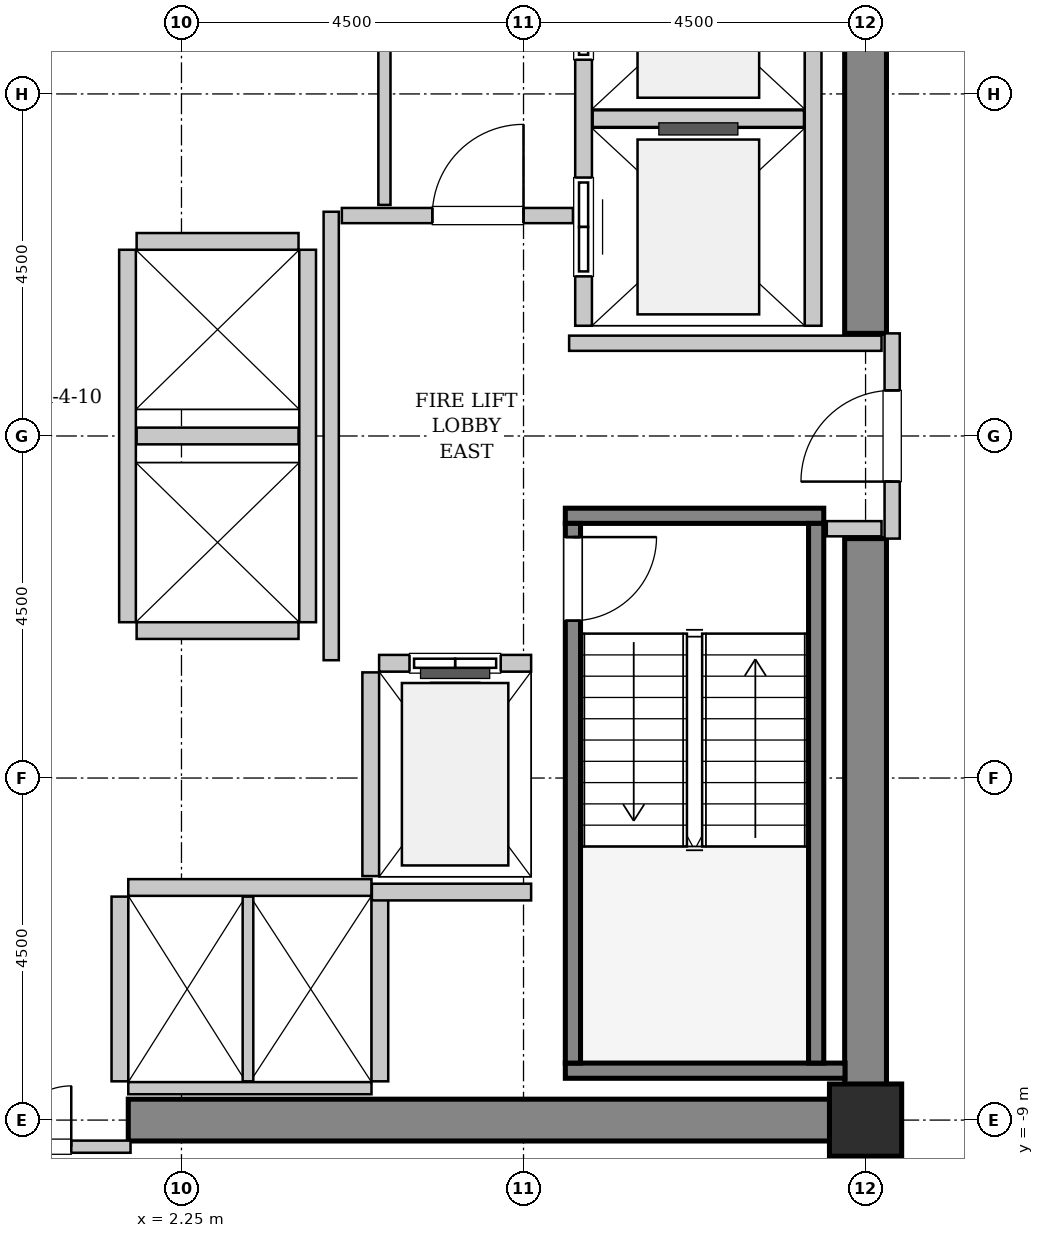
"""IFC4 building model, lengths in metres.
Left out: names, types, materials, properties, quantities, classifications, styles, units other than length and angle.
Written with IfcOpenShell. Run it as: python <this file> out.ifc"""

import sys

from ifc_helpers import new_model, si_unit, direction, frame, frame_2d, origin, origin_2d, place, context, subcontext, project, spatial, rectangle, hollow_rectangle, extrude, source, transform, mapped, element, fill, save


model = new_model("IFC4")
c1 = context("Model", 3, precision=1e-05, world=origin(), true_north=direction((0.0, 1.0)))
c2 = subcontext(c1, "Body", "Model", "MODEL_VIEW")
j1 = project(units=[si_unit("LENGTHUNIT", "METRE"), si_unit("PLANEANGLEUNIT", "RADIAN")], contexts=[c1])
p1 = place(None, origin())
s1 = spatial("IfcSite", under=j1, at=p1, CompositionType="ELEMENT")
p2 = place(p1, origin())
s2 = spatial("IfcBuilding", under=s1, at=p2, CompositionType="ELEMENT")
p3 = place(p2, frame((0.0, 0.0, 117.4)))
s3 = spatial("IfcBuildingStorey", under=s2, at=p3, CompositionType="ELEMENT", Elevation=117.4)
m1 = source(origin(), c2, "Body", "SweptSolid", [
    extrude(rectangle(XDim=9.975, YDim=0.55, at=frame_2d((4.987, 0.0))), origin(), (0.0, 0.0, 1.0), 3.8),
])
p4 = place(p3, frame((1.55, -9.0, 0.0), z_axis=(0.0, 0.0, 1.0), x_axis=(1.0, 0.0, 0.0)))
e1 = element("IfcWall", 1, at=p4, inside=s3, PredefinedType="SHEAR", context=c2, shape_type="MappedRepresentation", body=[
    mapped(m1, transform((0.0, 0.0, 0.0), x_axis=(1.0, 0.0, 0.0), y_axis=(0.0, 1.0, 0.0), z_axis=(0.0, 0.0, 1.0), scale=1.0)),
])
m2 = source(origin(), c2, "Body", "SweptSolid", [
    extrude(rectangle(XDim=7.375, YDim=0.55, at=frame_2d((3.688, 0.0))), origin(), (0.0, 0.0, 1.0), 3.8),
])
for number, where, z_axis, x_axis in (
    (2, (11.25, -8.725, 0.0), (0.0, 0.0, 1.0), (0.0, 1.0, 0.0)),
    (3, (11.25, 1.35, 0.0), (0.0, 0.0, 1.0), (0.0, 1.0, 0.0)),
):
    element("IfcWall", number, at=place(p3, frame(where, z_axis=z_axis, x_axis=x_axis)), inside=s3, PredefinedType="SHEAR", context=c2, shape_type="MappedRepresentation", body=[
        mapped(m2, transform((0.0, 0.0, 0.0), x_axis=(1.0, 0.0, 0.0), y_axis=(0.0, 1.0, 0.0), z_axis=(0.0, 0.0, 1.0), scale=1.0)),
    ])
m3 = source(origin(), c2, "Body", "SweptSolid", [
    extrude(hollow_rectangle(XDim=0.95, YDim=0.95, WallThickness=0.045, InnerFilletRadius=0.045, OuterFilletRadius=0.09, at=origin_2d()), origin(), (0.0, 0.0, 1.0), 3.8),
])
p5 = place(p3, frame((11.25, -9.0, 0.0), z_axis=(0.0, 0.0, 1.0), x_axis=(1.0, 0.0, 0.0)))
e4 = element("IfcColumn", 4, at=p5, inside=s3, PredefinedType="COLUMN", context=c2, shape_type="MappedRepresentation", body=[
    mapped(m3, transform((0.0, 0.0, 0.0), x_axis=(1.0, 0.0, 0.0), y_axis=(0.0, 1.0, 0.0), z_axis=(0.0, 0.0, 1.0), scale=1.0)),
])
m4 = source(origin(), c2, "Body", "SweptSolid", [
    extrude(rectangle(XDim=3.4, YDim=0.2, at=frame_2d((1.7, 0.0))), origin(), (0.0, 0.0, 1.0), 3.8),
])
p6 = place(p3, frame((7.3, -1.05, 0.0), z_axis=(0.0, 0.0, 1.0), x_axis=(1.0, 0.0, 0.0)))
e5 = element("IfcWall", 5, at=p6, inside=s3, PredefinedType="SOLIDWALL", context=c2, shape_type="MappedRepresentation", body=[
    mapped(m4, transform((0.0, 0.0, 0.0), x_axis=(1.0, 0.0, 0.0), y_axis=(0.0, 1.0, 0.0), z_axis=(0.0, 0.0, 1.0), scale=1.0)),
])
m5 = source(origin(), c2, "Body", "SweptSolid", [
    extrude(rectangle(XDim=3.68, YDim=0.2, at=frame_2d((1.84, 0.0))), origin(), (0.0, 0.0, 1.0), 3.8),
])
p7 = place(p3, frame((7.3, -8.35, 0.0), z_axis=(0.0, 0.0, 1.0), x_axis=(1.0, 0.0, 0.0)))
e6 = element("IfcWall", 6, at=p7, inside=s3, PredefinedType="SOLIDWALL", context=c2, shape_type="MappedRepresentation", body=[
    mapped(m5, transform((0.0, 0.0, 0.0), x_axis=(1.0, 0.0, 0.0), y_axis=(0.0, 1.0, 0.0), z_axis=(0.0, 0.0, 1.0), scale=1.0)),
])
m6 = source(origin(), c2, "Body", "SweptSolid", [
    extrude(rectangle(XDim=7.1, YDim=0.2, at=frame_2d((3.55, 0.0))), origin(), (0.0, 0.0, 1.0), 3.8),
])
p8 = place(p3, frame((7.4, -1.15, 0.0), z_axis=(0.0, 0.0, 1.0), x_axis=(0.0, -1.0, 0.0)))
e7 = element("IfcWall", 7, at=p8, inside=s3, PredefinedType="SOLIDWALL", context=c2, shape_type="MappedRepresentation", body=[
    mapped(m6, transform((0.0, 0.0, 0.0), x_axis=(1.0, 0.0, 0.0), y_axis=(0.0, 1.0, 0.0), z_axis=(0.0, 0.0, 1.0), scale=1.0)),
])
p9 = place(p8, frame((0.18, 0.0, 0.0)))
e8 = element("IfcOpeningElement", 8, at=p9, cuts=e7, PredefinedType="OPENING", context=c2, shape_type="SweptSolid", body=[
    extrude(rectangle(XDim=1.1, YDim=2.15, at=frame_2d((0.55, 1.075))), frame((0.0, 0.11, 0.0), z_axis=(0.0, -1.0, 0.0), x_axis=(1.0, 0.0, 0.0)), (0.0, 0.0, 1.0), 0.22),
])
p10 = place(p3, frame((10.6, -1.15, 0.0), z_axis=(0.0, 0.0, 1.0), x_axis=(0.0, -1.0, 0.0)))
e9 = element("IfcWall", 9, at=p10, inside=s3, PredefinedType="SOLIDWALL", context=c2, shape_type="MappedRepresentation", body=[
    mapped(m6, transform((0.0, 0.0, 0.0), x_axis=(1.0, 0.0, 0.0), y_axis=(0.0, 1.0, 0.0), z_axis=(0.0, 0.0, 1.0), scale=1.0)),
])
m7 = source(origin(), c2, "Body", "SweptSolid", [
    extrude(rectangle(XDim=2.0, YDim=0.22, at=frame_2d((1.0, 0.0))), origin(), (0.0, 0.0, 1.0), 3.535),
])
p11 = place(p3, frame((6.85, -2.99, 0.0), z_axis=(0.0, 0.0, 1.0), x_axis=(-1.0, 0.0, 0.0)))
e10 = element("IfcWall", 10, at=p11, inside=s3, PredefinedType="SOLIDWALL", context=c2, shape_type="MappedRepresentation", body=[
    mapped(m7, transform((0.0, 0.0, 0.0), x_axis=(1.0, 0.0, 0.0), y_axis=(0.0, 1.0, 0.0), z_axis=(0.0, 0.0, 1.0), scale=1.0)),
])
p12 = place(p11, frame((0.4, 0.0, 0.0)))
e11 = element("IfcOpeningElement", 11, at=p12, cuts=e10, PredefinedType="OPENING", context=c2, shape_type="SweptSolid", body=[
    extrude(rectangle(XDim=1.2, YDim=2.2, at=frame_2d((0.6, 1.1))), frame((0.0, 0.12, 0.0), z_axis=(0.0, -1.0, 0.0), x_axis=(1.0, 0.0, 0.0)), (0.0, 0.0, 1.0), 0.24),
])
m8 = source(origin(), c2, "Body", "SweptSolid", [
    extrude(rectangle(XDim=2.68, YDim=0.22, at=frame_2d((1.34, 0.0))), origin(), (0.0, 0.0, 1.0), 3.535),
])
p13 = place(p3, frame((4.74, -3.11, 0.0), z_axis=(0.0, 0.0, 1.0), x_axis=(0.0, -1.0, 0.0)))
e12 = element("IfcWall", 12, at=p13, inside=s3, PredefinedType="SOLIDWALL", context=c2, shape_type="MappedRepresentation", body=[
    mapped(m8, transform((0.0, 0.0, 0.0), x_axis=(1.0, 0.0, 0.0), y_axis=(0.0, 1.0, 0.0), z_axis=(0.0, 0.0, 1.0), scale=1.0)),
])
m9 = source(origin(), c2, "Body", "SweptSolid", [
    extrude(rectangle(XDim=5.45, YDim=0.22, at=frame_2d((2.725, 0.0))), origin(), (0.0, 0.0, 1.0), 3.535),
])
p14 = place(p3, frame((7.54, 6.9, 0.0), z_axis=(0.0, 0.0, 1.0), x_axis=(0.0, -1.0, 0.0)))
e13 = element("IfcWall", 13, at=p14, inside=s3, PredefinedType="SOLIDWALL", context=c2, shape_type="MappedRepresentation", body=[
    mapped(m9, transform((0.0, 0.0, 0.0), x_axis=(1.0, 0.0, 0.0), y_axis=(0.0, 1.0, 0.0), z_axis=(0.0, 0.0, 1.0), scale=1.0)),
])
p15 = place(p14, frame((3.5, 0.0, 0.0)))
e14 = element("IfcOpeningElement", 14, at=p15, cuts=e13, PredefinedType="OPENING", context=c2, shape_type="SweptSolid", body=[
    extrude(rectangle(XDim=1.3, YDim=2.3, at=frame_2d((0.65, 1.15))), frame((0.0, 0.12, 0.0), z_axis=(0.0, -1.0, 0.0), x_axis=(1.0, 0.0, 0.0)), (0.0, 0.0, 1.0), 0.24),
])
p16 = place(p14, frame((0.65, 0.0, 0.0)))
e15 = element("IfcOpeningElement", 15, at=p16, cuts=e13, PredefinedType="OPENING", context=c2, shape_type="SweptSolid", body=[
    extrude(rectangle(XDim=1.3, YDim=2.3, at=frame_2d((0.65, 1.15))), frame((0.0, 0.12, 0.0), z_axis=(0.0, -1.0, 0.0), x_axis=(1.0, 0.0, 0.0)), (0.0, 0.0, 1.0), 0.24),
])
p17 = place(p3, frame((10.56, 1.45, 0.0), z_axis=(0.0, 0.0, 1.0), x_axis=(0.0, 1.0, 0.0)))
e16 = element("IfcWall", 16, at=p17, inside=s3, PredefinedType="SOLIDWALL", context=c2, shape_type="MappedRepresentation", body=[
    mapped(m9, transform((0.0, 0.0, 0.0), x_axis=(1.0, 0.0, 0.0), y_axis=(0.0, 1.0, 0.0), z_axis=(0.0, 0.0, 1.0), scale=1.0)),
])
m10 = source(origin(), c2, "Body", "SweptSolid", [
    extrude(rectangle(XDim=2.78, YDim=0.22, at=frame_2d((1.39, 0.0))), origin(), (0.0, 0.0, 1.0), 3.535),
])
p18 = place(p3, frame((7.66, 4.175, 0.0), z_axis=(0.0, 0.0, 1.0), x_axis=(1.0, 0.0, 0.0)))
e17 = element("IfcWall", 17, at=p18, inside=s3, PredefinedType="SOLIDWALL", context=c2, shape_type="MappedRepresentation", body=[
    mapped(m10, transform((0.0, 0.0, 0.0), x_axis=(1.0, 0.0, 0.0), y_axis=(0.0, 1.0, 0.0), z_axis=(0.0, 0.0, 1.0), scale=1.0)),
])
m11 = source(origin(), c2, "Body", "SweptSolid", [
    extrude(rectangle(XDim=3.2, YDim=0.22, at=frame_2d((1.6, 0.0))), origin(), (0.0, 0.0, 1.0), 3.535),
])
p19 = place(p3, frame((4.75, -5.94, 0.0), z_axis=(0.0, 0.0, 1.0), x_axis=(-1.0, 0.0, 0.0)))
e18 = element("IfcWall", 18, at=p19, inside=s3, PredefinedType="SOLIDWALL", context=c2, shape_type="MappedRepresentation", body=[
    mapped(m11, transform((0.0, 0.0, 0.0), x_axis=(1.0, 0.0, 0.0), y_axis=(0.0, 1.0, 0.0), z_axis=(0.0, 0.0, 1.0), scale=1.0)),
])
m12 = source(origin(), c2, "Body", "SweptSolid", [
    extrude(rectangle(XDim=3.2, YDim=0.16, at=frame_2d((1.6, 0.0))), origin(), (0.0, 0.0, 1.0), 2.425),
])
p20 = place(p3, frame((1.55, -8.58, 0.0), z_axis=(0.0, 0.0, 1.0), x_axis=(1.0, 0.0, 0.0)))
e19 = element("IfcWall", 19, at=p20, inside=s3, PredefinedType="PARTITIONING", context=c2, shape_type="MappedRepresentation", body=[
    mapped(m12, transform((0.0, 0.0, 0.0), x_axis=(1.0, 0.0, 0.0), y_axis=(0.0, 1.0, 0.0), z_axis=(0.0, 0.0, 1.0), scale=1.0)),
])
m13 = source(origin(), c2, "Body", "SweptSolid", [
    extrude(rectangle(XDim=2.43, YDim=0.22, at=frame_2d((1.215, 0.0))), origin(), (0.0, 0.0, 1.0), 3.535),
])
p21 = place(p3, frame((1.44, -6.06, 0.0), z_axis=(0.0, 0.0, 1.0), x_axis=(0.0, -1.0, 0.0)))
e20 = element("IfcWall", 20, at=p21, inside=s3, PredefinedType="SOLIDWALL", context=c2, shape_type="MappedRepresentation", body=[
    mapped(m13, transform((0.0, 0.0, 0.0), x_axis=(1.0, 0.0, 0.0), y_axis=(0.0, 1.0, 0.0), z_axis=(0.0, 0.0, 1.0), scale=1.0)),
])
m14 = source(origin(), c2, "Body", "SweptSolid", [
    extrude(rectangle(XDim=2.43, YDim=0.14, at=frame_2d((1.215, 0.0))), origin(), (0.0, 0.0, 1.0), 3.535),
])
p22 = place(p3, frame((3.125, -8.49, 0.0), z_axis=(0.0, 0.0, 1.0), x_axis=(0.0, 1.0, 0.0)))
e21 = element("IfcWall", 21, at=p22, inside=s3, PredefinedType="PARTITIONING", context=c2, shape_type="MappedRepresentation", body=[
    mapped(m14, transform((0.0, 0.0, 0.0), x_axis=(1.0, 0.0, 0.0), y_axis=(0.0, 1.0, 0.0), z_axis=(0.0, 0.0, 1.0), scale=1.0)),
])
p23 = place(p3, frame((4.86, -8.49, 0.0), z_axis=(0.0, 0.0, 1.0), x_axis=(0.0, 1.0, 0.0)))
e22 = element("IfcWall", 22, at=p23, inside=s3, PredefinedType="SOLIDWALL", context=c2, shape_type="MappedRepresentation", body=[
    mapped(m13, transform((0.0, 0.0, 0.0), x_axis=(1.0, 0.0, 0.0), y_axis=(0.0, 1.0, 0.0), z_axis=(0.0, 0.0, 1.0), scale=1.0)),
])
m15 = source(origin(), c2, "Body", "SweptSolid", [
    extrude(rectangle(XDim=4.9, YDim=0.22, at=frame_2d((2.45, 0.0))), origin(), (0.0, 0.0, 1.0), 3.535),
])
for number, where, z_axis, x_axis in (
    (23, (1.54, 2.45, 0.0), (0.0, 0.0, 1.0), (0.0, -1.0, 0.0)),
    (24, (3.91, -2.45, 0.0), (0.0, 0.0, 1.0), (0.0, 1.0, 0.0)),
):
    element("IfcWall", number, at=place(p3, frame(where, z_axis=z_axis, x_axis=x_axis)), inside=s3, PredefinedType="SOLIDWALL", context=c2, shape_type="MappedRepresentation", body=[
        mapped(m15, transform((0.0, 0.0, 0.0), x_axis=(1.0, 0.0, 0.0), y_axis=(0.0, 1.0, 0.0), z_axis=(0.0, 0.0, 1.0), scale=1.0)),
    ])
m16 = source(origin(), c2, "Body", "SweptSolid", [
    extrude(rectangle(XDim=2.13, YDim=0.22, at=frame_2d((1.065, 0.0))), origin(), (0.0, 0.0, 1.0), 3.535),
])
for number, where, z_axis, x_axis in (
    (25, (1.66, -2.56, 0.0), (0.0, 0.0, 1.0), (1.0, 0.0, 0.0)),
    (26, (1.66, 0.0, 0.0), (0.0, 0.0, 1.0), (1.0, 0.0, 0.0)),
    (27, (3.79, 2.56, 0.0), (0.0, 0.0, 1.0), (-1.0, 0.0, 0.0)),
):
    element("IfcWall", number, at=place(p3, frame(where, z_axis=z_axis, x_axis=x_axis)), inside=s3, PredefinedType="SOLIDWALL", context=c2, shape_type="MappedRepresentation", body=[
        mapped(m16, transform((0.0, 0.0, 0.0), x_axis=(1.0, 0.0, 0.0), y_axis=(0.0, 1.0, 0.0), z_axis=(0.0, 0.0, 1.0), scale=1.0)),
    ])
m17 = source(origin(), c2, "Body", "SweptSolid", [
    extrude(rectangle(XDim=2.095, YDim=0.22, at=frame_2d((1.048, 0.0))), origin(), (0.0, 0.0, 1.0), 3.535),
])
p24 = place(p3, frame((4.755, -6.0, 0.0), z_axis=(0.0, 0.0, 1.0), x_axis=(1.0, 0.0, 0.0)))
e28 = element("IfcWall", 28, at=p24, inside=s3, PredefinedType="SOLIDWALL", context=c2, shape_type="MappedRepresentation", body=[
    mapped(m17, transform((0.0, 0.0, 0.0), x_axis=(1.0, 0.0, 0.0), y_axis=(0.0, 1.0, 0.0), z_axis=(0.0, 0.0, 1.0), scale=1.0)),
])
m18 = source(origin(), c2, "Body", "SweptSolid", [
    extrude(rectangle(XDim=2.7, YDim=0.2, at=frame_2d((1.35, 0.0))), origin(), (0.0, 0.0, 1.0), 2.425),
])
p25 = place(p3, frame((11.6, -1.35, 0.0), z_axis=(0.0, 0.0, 1.0), x_axis=(0.0, 1.0, 0.0)))
e29 = element("IfcWall", 29, at=p25, inside=s3, PredefinedType="PARTITIONING", context=c2, shape_type="MappedRepresentation", body=[
    mapped(m18, transform((0.0, 0.0, 0.0), x_axis=(1.0, 0.0, 0.0), y_axis=(0.0, 1.0, 0.0), z_axis=(0.0, 0.0, 1.0), scale=1.0)),
])
p26 = place(p25, frame((0.75, 0.0, 0.0)))
e30 = element("IfcOpeningElement", 30, at=p26, cuts=e29, PredefinedType="OPENING", context=c2, shape_type="SweptSolid", body=[
    extrude(rectangle(XDim=1.2, YDim=2.15, at=frame_2d((0.6, 1.075))), frame((0.0, 0.11, 0.0), z_axis=(0.0, -1.0, 0.0), x_axis=(1.0, 0.0, 0.0)), (0.0, 0.0, 1.0), 0.22),
])
m19 = source(origin(), c2, "Body", "SweptSolid", [
    extrude(rectangle(XDim=5.9, YDim=0.2, at=frame_2d((2.95, 0.0))), origin(), (0.0, 0.0, 1.0), 3.535),
])
p27 = place(p3, frame((4.22, -2.95, 0.0), z_axis=(0.0, 0.0, 1.0), x_axis=(0.0, 1.0, 0.0)))
e31 = element("IfcWall", 31, at=p27, inside=s3, PredefinedType="PARTITIONING", context=c2, shape_type="MappedRepresentation", body=[
    mapped(m19, transform((0.0, 0.0, 0.0), x_axis=(1.0, 0.0, 0.0), y_axis=(0.0, 1.0, 0.0), z_axis=(0.0, 0.0, 1.0), scale=1.0)),
])
m20 = source(origin(), c2, "Body", "SweptSolid", [
    extrude(rectangle(XDim=3.04, YDim=0.2, at=frame_2d((1.52, 0.0))), origin(), (0.0, 0.0, 1.0), 3.535),
])
p28 = place(p3, frame((4.36, 2.9, 0.0), z_axis=(0.0, 0.0, 1.0), x_axis=(1.0, 0.0, 0.0)))
e32 = element("IfcWall", 32, at=p28, inside=s3, PredefinedType="PARTITIONING", context=c2, shape_type="MappedRepresentation", body=[
    mapped(m20, transform((0.0, 0.0, 0.0), x_axis=(1.0, 0.0, 0.0), y_axis=(0.0, 1.0, 0.0), z_axis=(0.0, 0.0, 1.0), scale=1.0)),
])
p29 = place(p28, frame((1.19, 0.0, 0.0)))
e33 = element("IfcOpeningElement", 33, at=p29, cuts=e32, PredefinedType="OPENING", context=c2, shape_type="SweptSolid", body=[
    extrude(rectangle(XDim=1.2, YDim=2.15, at=frame_2d((0.6, 1.075))), frame((0.0, 0.11, 0.0), z_axis=(0.0, -1.0, 0.0), x_axis=(1.0, 0.0, 0.0)), (0.0, 0.0, 1.0), 0.22),
])
m21 = source(origin(), c2, "Body", "SweptSolid", [
    extrude(rectangle(XDim=4.11, YDim=0.2, at=frame_2d((2.055, 0.0))), origin(), (0.0, 0.0, 1.0), 3.535),
])
p30 = place(p3, frame((7.35, 1.22, 0.0), z_axis=(0.0, 0.0, 1.0), x_axis=(1.0, 0.0, 0.0)))
e34 = element("IfcWall", 34, at=p30, inside=s3, PredefinedType="PARTITIONING", context=c2, shape_type="MappedRepresentation", body=[
    mapped(m21, transform((0.0, 0.0, 0.0), x_axis=(1.0, 0.0, 0.0), y_axis=(0.0, 1.0, 0.0), z_axis=(0.0, 0.0, 1.0), scale=1.0)),
])
m22 = source(origin(), c2, "Body", "SweptSolid", [
    extrude(rectangle(XDim=0.72, YDim=0.2, at=frame_2d((0.36, 0.0))), origin(), (0.0, 0.0, 1.0), 3.535),
])
p31 = place(p3, frame((10.74, -1.22, 0.0), z_axis=(0.0, 0.0, 1.0), x_axis=(1.0, 0.0, 0.0)))
e35 = element("IfcWall", 35, at=p31, inside=s3, PredefinedType="PARTITIONING", context=c2, shape_type="MappedRepresentation", body=[
    mapped(m22, transform((0.0, 0.0, 0.0), x_axis=(1.0, 0.0, 0.0), y_axis=(0.0, 1.0, 0.0), z_axis=(0.0, 0.0, 1.0), scale=1.0)),
])
m23 = source(origin(), c2, "Body", "SweptSolid", [
    extrude(rectangle(XDim=3.16, YDim=0.16, at=frame_2d((1.58, 0.0))), origin(), (0.0, 0.0, 1.0), 2.425),
])
p32 = place(p3, frame((-1.58, -9.35, 0.0), z_axis=(0.0, 0.0, 1.0), x_axis=(1.0, 0.0, 0.0)))
e36 = element("IfcWall", 36, at=p32, inside=s3, PredefinedType="PARTITIONING", context=c2, shape_type="MappedRepresentation", body=[
    mapped(m23, transform((0.0, 0.0, 0.0), x_axis=(1.0, 0.0, 0.0), y_axis=(0.0, 1.0, 0.0), z_axis=(0.0, 0.0, 1.0), scale=1.0)),
])
p33 = place(p32, frame((0.78, 0.0, 0.0)))
e37 = element("IfcOpeningElement", 37, at=p33, cuts=e36, PredefinedType="OPENING", context=c2, shape_type="SweptSolid", body=[
    extrude(rectangle(XDim=1.6, YDim=2.3, at=frame_2d((0.8, 1.15))), frame((0.0, 0.09, 0.0), z_axis=(0.0, -1.0, 0.0), x_axis=(1.0, 0.0, 0.0)), (0.0, 0.0, 1.0), 0.18),
])
m24 = source(origin(), c2, "Body", "SweptSolid", [
    extrude(rectangle(XDim=3.015, YDim=0.16, at=frame_2d((1.507, 0.0))), origin(), (0.0, 0.0, 1.0), 3.535),
])
p34 = place(p3, frame((4.92, 3.04, 0.0), z_axis=(0.0, 0.0, 1.0), x_axis=(0.0, 1.0, 0.0)))
e38 = element("IfcWall", 38, at=p34, inside=s3, PredefinedType="PARTITIONING", context=c2, shape_type="MappedRepresentation", body=[
    mapped(m24, transform((0.0, 0.0, 0.0), x_axis=(1.0, 0.0, 0.0), y_axis=(0.0, 1.0, 0.0), z_axis=(0.0, 0.0, 1.0), scale=1.0)),
])
m25 = source(origin(), c2, "Body", "SweptSolid", [
    extrude(rectangle(XDim=1.1, YDim=2.15, at=frame_2d((0.55, 1.075))), frame((0.0, 0.025, 0.0), z_axis=(0.0, -1.0, 0.0), x_axis=(1.0, 0.0, 0.0)), (0.0, 0.0, 1.0), 0.05),
])
p35 = place(p9, origin())
e39 = element("IfcDoor", 39, at=p35, inside=s3, OperationType="SINGLE_SWING_LEFT", PredefinedType="DOOR", context=c2, shape_type="MappedRepresentation", body=[
    mapped(m25, transform((0.0, 0.0, 0.0), x_axis=(1.0, 0.0, 0.0), y_axis=(0.0, 1.0, 0.0), z_axis=(0.0, 0.0, 1.0), scale=1.0)),
])
fill(e8, e39)
m26 = source(origin(), c2, "Body", "SweptSolid", [
    extrude(rectangle(XDim=1.2, YDim=2.2, at=frame_2d((0.6, 1.1))), frame((0.0, 0.025, 0.0), z_axis=(0.0, -1.0, 0.0), x_axis=(1.0, 0.0, 0.0)), (0.0, 0.0, 1.0), 0.05),
])
p36 = place(p12, origin())
e40 = element("IfcDoor", 40, at=p36, inside=s3, OperationType="SLIDING_TO_LEFT", PredefinedType="DOOR", context=c2, shape_type="MappedRepresentation", body=[
    mapped(m26, transform((0.0, 0.0, 0.0), x_axis=(1.0, 0.0, 0.0), y_axis=(0.0, 1.0, 0.0), z_axis=(0.0, 0.0, 1.0), scale=1.0)),
])
fill(e11, e40)
m27 = source(origin(), c2, "Body", "SweptSolid", [
    extrude(rectangle(XDim=1.3, YDim=2.3, at=frame_2d((0.65, 1.15))), frame((0.0, 0.025, 0.0), z_axis=(0.0, -1.0, 0.0), x_axis=(1.0, 0.0, 0.0)), (0.0, 0.0, 1.0), 0.05),
])
p37 = place(p15, origin())
e41 = element("IfcDoor", 41, at=p37, inside=s3, OperationType="SLIDING_TO_RIGHT", PredefinedType="DOOR", context=c2, shape_type="MappedRepresentation", body=[
    mapped(m27, transform((0.0, 0.0, 0.0), x_axis=(1.0, 0.0, 0.0), y_axis=(0.0, 1.0, 0.0), z_axis=(0.0, 0.0, 1.0), scale=1.0)),
])
fill(e14, e41)
p38 = place(p16, origin())
e42 = element("IfcDoor", 42, at=p38, inside=s3, OperationType="SLIDING_TO_RIGHT", PredefinedType="DOOR", context=c2, shape_type="MappedRepresentation", body=[
    mapped(m27, transform((0.0, 0.0, 0.0), x_axis=(1.0, 0.0, 0.0), y_axis=(0.0, 1.0, 0.0), z_axis=(0.0, 0.0, 1.0), scale=1.0)),
])
fill(e15, e42)
m28 = source(origin(), c2, "Body", "SweptSolid", [
    extrude(rectangle(XDim=1.2, YDim=2.15, at=frame_2d((0.6, 1.075))), frame((0.0, 0.025, 0.0), z_axis=(0.0, -1.0, 0.0), x_axis=(1.0, 0.0, 0.0)), (0.0, 0.0, 1.0), 0.05),
])
p39 = place(p26, origin())
e43 = element("IfcDoor", 43, at=p39, inside=s3, OperationType="SINGLE_SWING_LEFT", PredefinedType="DOOR", context=c2, shape_type="MappedRepresentation", body=[
    mapped(m28, transform((0.0, 0.0, 0.0), x_axis=(1.0, 0.0, 0.0), y_axis=(0.0, 1.0, 0.0), z_axis=(0.0, 0.0, 1.0), scale=1.0)),
])
fill(e30, e43)
p40 = place(p29, origin())
e44 = element("IfcDoor", 44, at=p40, inside=s3, OperationType="SINGLE_SWING_RIGHT", PredefinedType="DOOR", context=c2, shape_type="MappedRepresentation", body=[
    mapped(m28, transform((0.0, 0.0, 0.0), x_axis=(1.0, 0.0, 0.0), y_axis=(0.0, 1.0, 0.0), z_axis=(0.0, 0.0, 1.0), scale=1.0)),
])
fill(e33, e44)
m29 = source(origin(), c2, "Body", "SweptSolid", [
    extrude(rectangle(XDim=1.6, YDim=2.3, at=frame_2d((0.8, 1.15))), frame((0.0, 0.025, 0.0), z_axis=(0.0, -1.0, 0.0), x_axis=(1.0, 0.0, 0.0)), (0.0, 0.0, 1.0), 0.05),
])
p41 = place(p33, origin())
e45 = element("IfcDoor", 45, at=p41, inside=s3, OperationType="DOUBLE_DOOR_SINGLE_SWING", PredefinedType="DOOR", context=c2, shape_type="MappedRepresentation", body=[
    mapped(m29, transform((0.0, 0.0, 0.0), x_axis=(1.0, 0.0, 0.0), y_axis=(0.0, 1.0, 0.0), z_axis=(0.0, 0.0, 1.0), scale=1.0)),
])
fill(e37, e45)
save(model, sys.argv[1])
